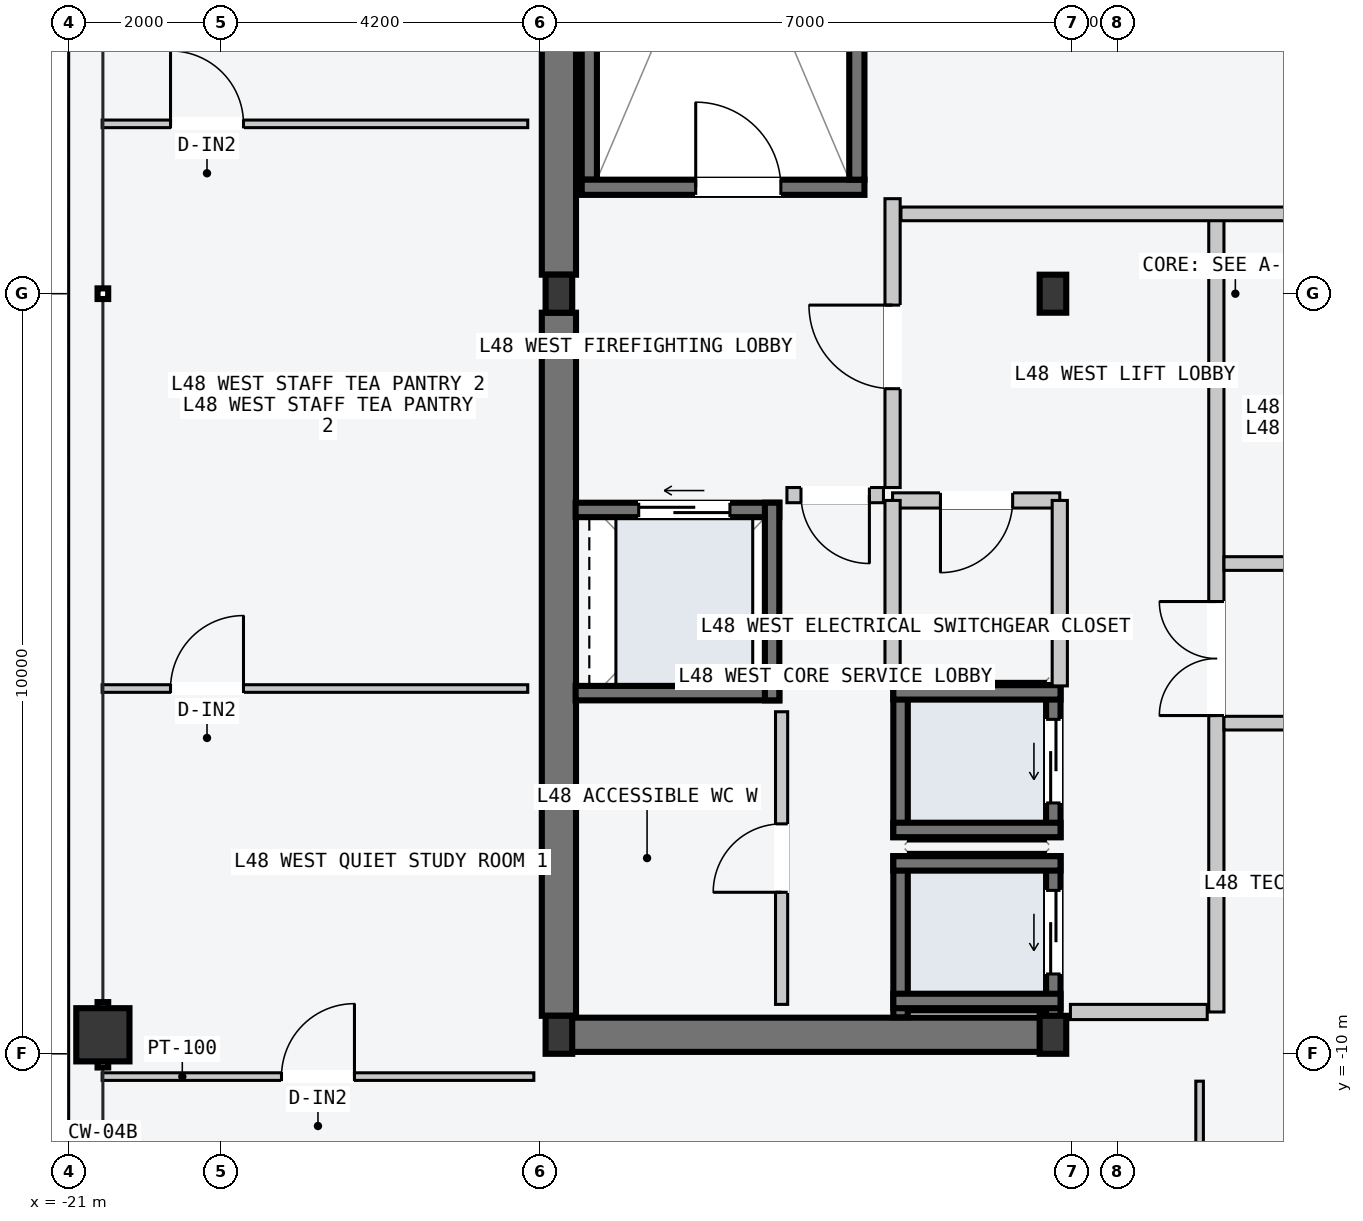
"""IFC4 building model, lengths in metres.
Left out: names, types, materials, properties, quantities, classifications, styles, units other than length and angle.
Written with IfcOpenShell. Run it as: python <this file> out.ifc"""

import sys

from ifc_helpers import new_model, si_unit, direction, frame, frame_2d, origin, origin_2d, place, context, subcontext, project, spatial, rectangle, hollow_rectangle, i_section, extrude, element, fill, save


model = new_model("IFC4")
c1 = context("Model", 3, precision=1e-05, world=origin(), true_north=direction((0.0, 1.0)))
c2 = subcontext(c1, "Body", "Model", "MODEL_VIEW")
j1 = project(units=[si_unit("LENGTHUNIT", "METRE"), si_unit("PLANEANGLEUNIT", "RADIAN")], contexts=[c1])
p1 = place(None, origin())
s1 = spatial("IfcSite", under=j1, at=p1, CompositionType="ELEMENT")
p2 = place(p1, origin())
s2 = spatial("IfcBuilding", under=s1, at=p2, CompositionType="ELEMENT")
p3 = place(p2, frame((0.0, 0.0, 183.9)))
s3 = spatial("IfcBuildingStorey", under=s2, at=p3, CompositionType="ELEMENT", Elevation=183.9)
p4 = place(p3, frame((-14.53, -9.75, -0.2), z_axis=(0.0, 0.0, 1.0), x_axis=(1.0, 0.0, 0.0)))
e1 = element("IfcWall", 1, at=p4, inside=s3, PredefinedType="SHEAR", context=c2, shape_type="SweptSolid", body=[
    extrude(rectangle(XDim=6.46, YDim=0.45, at=frame_2d((3.23, 0.0))), origin(), (0.0, 0.0, 1.0), 3.6),
])
for number, where, z_axis, x_axis in (
    (2, (-14.55, -9.5, -0.2), (0.0, 0.0, 1.0), (0.0, 1.0, 0.0)),
    (3, (-14.55, 0.25, -0.2), (0.0, 0.0, 1.0), (0.0, 1.0, 0.0)),
):
    element("IfcWall", number, at=place(p3, frame(where, z_axis=z_axis, x_axis=x_axis)), inside=s3, PredefinedType="SHEAR", context=c2, shape_type="SweptSolid", body=[
        extrude(rectangle(XDim=9.25, YDim=0.45, at=frame_2d((4.625, 0.0))), origin(), (0.0, 0.0, 1.0), 3.6),
    ])
p5 = place(p3, frame((-14.15, 1.5, -0.2), z_axis=(0.0, 0.0, 1.0), x_axis=(0.0, 1.0, 0.0)))
e4 = element("IfcWall", 4, at=p5, inside=s3, PredefinedType="SOLIDWALL", context=c2, shape_type="SweptSolid", body=[
    extrude(rectangle(XDim=7.8, YDim=0.2, at=frame_2d((3.9, 0.0))), origin(), (0.0, 0.0, 1.0), 3.6),
])
p6 = place(p3, frame((-14.25, 1.4, -0.2), z_axis=(0.0, 0.0, 1.0), x_axis=(1.0, 0.0, 0.0)))
e5 = element("IfcWall", 5, at=p6, inside=s3, PredefinedType="SOLIDWALL", context=c2, shape_type="SweptSolid", body=[
    extrude(rectangle(XDim=3.72, YDim=0.2, at=frame_2d((1.86, 0.0))), origin(), (0.0, 0.0, 1.0), 3.6),
])
p7 = place(p6, frame((1.5, 0.0, 0.2)))
e6 = element("IfcOpeningElement", 6, at=p7, cuts=e5, PredefinedType="OPENING", context=c2, shape_type="SweptSolid", body=[
    extrude(rectangle(XDim=1.12, YDim=2.18, at=frame_2d((0.56, 1.09))), frame((0.0, 0.11, 0.0), z_axis=(0.0, -1.0, 0.0), x_axis=(1.0, 0.0, 0.0)), (0.0, 0.0, 1.0), 0.22),
])
p8 = place(p3, frame((-10.63, 1.5, -0.2), z_axis=(0.0, 0.0, 1.0), x_axis=(0.0, 1.0, 0.0)))
e7 = element("IfcWall", 7, at=p8, inside=s3, PredefinedType="SOLIDWALL", context=c2, shape_type="SweptSolid", body=[
    extrude(rectangle(XDim=7.8, YDim=0.2, at=frame_2d((3.9, 0.0))), origin(), (0.0, 0.0, 1.0), 3.6),
])
for number, where, z_axis, x_axis in (
    (8, (-14.55, -9.75, 0.0), (0.0, 0.0, 1.0), (1.0, 0.0, 0.0)),
    (9, (-14.55, 0.0, 0.0), (0.0, 0.0, 1.0), (1.0, 0.0, 0.0)),
    (10, (-8.05, -9.75, 0.0), (0.0, 0.0, 1.0), (1.0, 0.0, 0.0)),
    (11, (-8.05, 0.0, 0.0), (0.0, 0.0, 1.0), (1.0, 0.0, 0.0)),
):
    element("IfcColumn", number, at=place(p3, frame(where, z_axis=z_axis, x_axis=x_axis)), inside=s3, PredefinedType="COLUMN", context=c2, shape_type="SweptSolid", body=[
        extrude(i_section(OverallWidth=0.35, OverallDepth=0.5, WebThickness=0.02, FlangeThickness=0.032, at=origin_2d()), origin(), (0.0, 0.0, 1.0), 3.6),
    ])
p9 = place(p3, frame((-20.55, -9.75, 0.0), z_axis=(0.0, 0.0, 1.0), x_axis=(0.0, 1.0, 0.0)))
e12 = element("IfcColumn", 12, at=p9, inside=s3, PredefinedType="COLUMN", context=c2, shape_type="SweptSolid", body=[
    extrude(hollow_rectangle(XDim=0.7, YDim=0.7, WallThickness=0.03, at=origin_2d()), origin(), (0.0, 0.0, 1.0), 3.6),
])
p10 = place(p3, frame((-8.045, -9.52, -0.2), z_axis=(0.0, 0.0, 1.0), x_axis=(0.0, 1.0, 0.0)))
e13 = element("IfcWall", 13, at=p10, inside=s3, PredefinedType="SOLIDWALL", context=c2, shape_type="SweptSolid", body=[
    extrude(rectangle(XDim=2.12, YDim=0.19, at=frame_2d((1.06, 0.0))), origin(), (0.0, 0.0, 1.0), 3.6),
])
p11 = place(p10, frame((0.57, 0.0, 0.2)))
e14 = element("IfcOpeningElement", 14, at=p11, cuts=e13, PredefinedType="OPENING", context=c2, shape_type="SweptSolid", body=[
    extrude(rectangle(XDim=1.1, YDim=2.2, at=frame_2d((0.55, 1.1))), frame((0.0, 0.105, 0.0), z_axis=(0.0, -1.0, 0.0), x_axis=(1.0, 0.0, 0.0)), (0.0, 0.0, 1.0), 0.21),
])
p12 = place(p3, frame((-10.055, -9.52, -0.2), z_axis=(0.0, 0.0, 1.0), x_axis=(0.0, 1.0, 0.0)))
e15 = element("IfcWall", 15, at=p12, inside=s3, PredefinedType="SOLIDWALL", context=c2, shape_type="SweptSolid", body=[
    extrude(rectangle(XDim=2.12, YDim=0.19, at=frame_2d((1.06, 0.0))), origin(), (0.0, 0.0, 1.0), 3.6),
])
for number, where, z_axis, x_axis in (
    (16, (-10.15, -7.495, -0.2), (0.0, 0.0, 1.0), (1.0, 0.0, 0.0)),
    (17, (-10.15, -9.305, -0.2), (0.0, 0.0, 1.0), (1.0, 0.0, 0.0)),
):
    element("IfcWall", number, at=place(p3, frame(where, z_axis=z_axis, x_axis=x_axis)), inside=s3, PredefinedType="SOLIDWALL", context=c2, shape_type="SweptSolid", body=[
        extrude(rectangle(XDim=2.2, YDim=0.19, at=frame_2d((1.1, 0.0))), origin(), (0.0, 0.0, 1.0), 3.6),
    ])
p13 = place(p3, frame((-8.045, -7.15, -0.2), z_axis=(0.0, 0.0, 1.0), x_axis=(0.0, 1.0, 0.0)))
e18 = element("IfcWall", 18, at=p13, inside=s3, PredefinedType="SOLIDWALL", context=c2, shape_type="SweptSolid", body=[
    extrude(rectangle(XDim=2.0, YDim=0.19, at=frame_2d((1.0, 0.0))), origin(), (0.0, 0.0, 1.0), 3.6),
])
p14 = place(p13, frame((0.45, 0.0, 0.2)))
e19 = element("IfcOpeningElement", 19, at=p14, cuts=e18, PredefinedType="OPENING", context=c2, shape_type="SweptSolid", body=[
    extrude(rectangle(XDim=1.1, YDim=2.2, at=frame_2d((0.55, 1.1))), frame((0.0, 0.105, 0.0), z_axis=(0.0, -1.0, 0.0), x_axis=(1.0, 0.0, 0.0)), (0.0, 0.0, 1.0), 0.21),
])
p15 = place(p3, frame((-10.055, -7.15, -0.2), z_axis=(0.0, 0.0, 1.0), x_axis=(0.0, 1.0, 0.0)))
e20 = element("IfcWall", 20, at=p15, inside=s3, PredefinedType="SOLIDWALL", context=c2, shape_type="SweptSolid", body=[
    extrude(rectangle(XDim=2.0, YDim=0.19, at=frame_2d((1.0, 0.0))), origin(), (0.0, 0.0, 1.0), 3.6),
])
for number, where, z_axis, x_axis in (
    (21, (-10.15, -5.245, -0.2), (0.0, 0.0, 1.0), (1.0, 0.0, 0.0)),
    (22, (-10.15, -7.055, -0.2), (0.0, 0.0, 1.0), (1.0, 0.0, 0.0)),
):
    element("IfcWall", number, at=place(p3, frame(where, z_axis=z_axis, x_axis=x_axis)), inside=s3, PredefinedType="SOLIDWALL", context=c2, shape_type="SweptSolid", body=[
        extrude(rectangle(XDim=2.2, YDim=0.19, at=frame_2d((1.1, 0.0))), origin(), (0.0, 0.0, 1.0), 3.6),
    ])
p16 = place(p3, frame((-14.33, -2.845, -0.2), z_axis=(0.0, 0.0, 1.0), x_axis=(1.0, 0.0, 0.0)))
e23 = element("IfcWall", 23, at=p16, inside=s3, PredefinedType="SOLIDWALL", context=c2, shape_type="SweptSolid", body=[
    extrude(rectangle(XDim=2.68, YDim=0.19, at=frame_2d((1.34, 0.0))), origin(), (0.0, 0.0, 1.0), 3.6),
])
p17 = place(p16, frame((0.83, 0.0, 0.2)))
e24 = element("IfcOpeningElement", 24, at=p17, cuts=e23, PredefinedType="OPENING", context=c2, shape_type="SweptSolid", body=[
    extrude(rectangle(XDim=1.2, YDim=2.2, at=frame_2d((0.6, 1.1))), frame((0.0, 0.105, 0.0), z_axis=(0.0, -1.0, 0.0), x_axis=(1.0, 0.0, 0.0)), (0.0, 0.0, 1.0), 0.21),
])
p18 = place(p3, frame((-14.33, -5.255, -0.2), z_axis=(0.0, 0.0, 1.0), x_axis=(1.0, 0.0, 0.0)))
e25 = element("IfcWall", 25, at=p18, inside=s3, PredefinedType="SOLIDWALL", context=c2, shape_type="SweptSolid", body=[
    extrude(rectangle(XDim=2.68, YDim=0.19, at=frame_2d((1.34, 0.0))), origin(), (0.0, 0.0, 1.0), 3.6),
])
p19 = place(p3, frame((-11.745, -5.35, -0.2), z_axis=(0.0, 0.0, 1.0), x_axis=(0.0, 1.0, 0.0)))
e26 = element("IfcWall", 26, at=p19, inside=s3, PredefinedType="SOLIDWALL", context=c2, shape_type="SweptSolid", body=[
    extrude(rectangle(XDim=2.6, YDim=0.19, at=frame_2d((1.3, 0.0))), origin(), (0.0, 0.0, 1.0), 3.6),
])
p20 = place(p3, frame((-5.9, -9.45, 0.0), z_axis=(0.0, 0.0, 1.0), x_axis=(0.0, 1.0, 0.0)))
e27 = element("IfcWall", 27, at=p20, inside=s3, PredefinedType="PARTITIONING", context=c2, shape_type="SweptSolid", body=[
    extrude(rectangle(XDim=10.5, YDim=0.2, at=frame_2d((5.25, 0.0))), origin(), (0.0, 0.0, 1.0), 3.4),
])
p21 = place(p20, frame((3.9, 0.0, 0.0)))
e28 = element("IfcOpeningElement", 28, at=p21, cuts=e27, PredefinedType="OPENING", context=c2, shape_type="SweptSolid", body=[
    extrude(rectangle(XDim=1.5, YDim=2.2, at=frame_2d((0.75, 1.1))), frame((0.0, 0.11, 0.0), z_axis=(0.0, -1.0, 0.0), x_axis=(1.0, 0.0, 0.0)), (0.0, 0.0, 1.0), 0.22),
])
p22 = place(p3, frame((-6.02, -9.45, 0.0), z_axis=(0.0, 0.0, 1.0), x_axis=(-1.0, 0.0, 0.0)))
e29 = element("IfcWall", 29, at=p22, inside=s3, PredefinedType="PARTITIONING", context=c2, shape_type="SweptSolid", body=[
    extrude(rectangle(XDim=1.8, YDim=0.2, at=frame_2d((0.9, 0.0))), origin(), (0.0, 0.0, 1.0), 3.4),
])
p23 = place(p3, frame((-10.16, -2.55, 0.0), z_axis=(0.0, 0.0, 1.0), x_axis=(0.0, 1.0, 0.0)))
e30 = element("IfcWall", 30, at=p23, inside=s3, PredefinedType="PARTITIONING", context=c2, shape_type="SweptSolid", body=[
    extrude(rectangle(XDim=3.8, YDim=0.2, at=frame_2d((1.9, 0.0))), origin(), (0.0, 0.0, 1.0), 3.4),
])
p24 = place(p23, frame((1.3, 0.0, 0.0)))
e31 = element("IfcOpeningElement", 31, at=p24, cuts=e30, PredefinedType="OPENING", context=c2, shape_type="SweptSolid", body=[
    extrude(rectangle(XDim=1.1, YDim=2.15, at=frame_2d((0.55, 1.075))), frame((0.0, 0.11, 0.0), z_axis=(0.0, -1.0, 0.0), x_axis=(1.0, 0.0, 0.0)), (0.0, 0.0, 1.0), 0.22),
])
p25 = place(p3, frame((-10.28, -2.65, 0.0), z_axis=(0.0, 0.0, 1.0), x_axis=(-1.0, 0.0, 0.0)))
e32 = element("IfcWall", 32, at=p25, inside=s3, PredefinedType="PARTITIONING", context=c2, shape_type="SweptSolid", body=[
    extrude(rectangle(XDim=1.27, YDim=0.2, at=frame_2d((0.635, 0.0))), origin(), (0.0, 0.0, 1.0), 3.4),
])
p26 = place(p25, frame((0.185, 0.0, 0.0)))
e33 = element("IfcOpeningElement", 33, at=p26, cuts=e32, PredefinedType="OPENING", context=c2, shape_type="SweptSolid", body=[
    extrude(rectangle(XDim=0.9, YDim=2.15, at=frame_2d((0.45, 1.075))), frame((0.0, 0.11, 0.0), z_axis=(0.0, -1.0, 0.0), x_axis=(1.0, 0.0, 0.0)), (0.0, 0.0, 1.0), 0.22),
])
p27 = place(p3, frame((-7.96, -2.72, 0.0), z_axis=(0.0, 0.0, 1.0), x_axis=(-1.0, 0.0, 0.0)))
e34 = element("IfcWall", 34, at=p27, inside=s3, PredefinedType="PARTITIONING", context=c2, shape_type="SweptSolid", body=[
    extrude(rectangle(XDim=2.2, YDim=0.2, at=frame_2d((1.1, 0.0))), origin(), (0.0, 0.0, 1.0), 3.4),
])
p28 = place(p27, frame((0.62, 0.0, 0.0)))
e35 = element("IfcOpeningElement", 35, at=p28, cuts=e34, PredefinedType="OPENING", context=c2, shape_type="SweptSolid", body=[
    extrude(rectangle(XDim=0.95, YDim=2.1, at=frame_2d((0.475, 1.05))), frame((0.0, 0.11, 0.0), z_axis=(0.0, -1.0, 0.0), x_axis=(1.0, 0.0, 0.0)), (0.0, 0.0, 1.0), 0.22),
])
for number, where, z_axis, x_axis in (
    (36, (-7.96, -5.16, 0.0), (0.0, 0.0, 1.0), (0.0, 1.0, 0.0)),
    (37, (-10.16, -5.16, 0.0), (0.0, 0.0, 1.0), (0.0, 1.0, 0.0)),
):
    element("IfcWall", number, at=place(p3, frame(where, z_axis=z_axis, x_axis=x_axis)), inside=s3, PredefinedType="PARTITIONING", context=c2, shape_type="SweptSolid", body=[
        extrude(rectangle(XDim=2.44, YDim=0.2, at=frame_2d((1.22, 0.0))), origin(), (0.0, 0.0, 1.0), 3.4),
    ])
p29 = place(p3, frame((-11.62, -9.35, 0.0), z_axis=(0.0, 0.0, 1.0), x_axis=(0.0, 1.0, 0.0)))
e38 = element("IfcWall", 38, at=p29, inside=s3, PredefinedType="PARTITIONING", context=c2, shape_type="SweptSolid", body=[
    extrude(rectangle(XDim=3.85, YDim=0.16, at=frame_2d((1.925, 0.0))), origin(), (0.0, 0.0, 1.0), 3.4),
])
p30 = place(p29, frame((1.475, 0.0, 0.0)))
e39 = element("IfcOpeningElement", 39, at=p30, cuts=e38, PredefinedType="OPENING", context=c2, shape_type="SweptSolid", body=[
    extrude(rectangle(XDim=0.9, YDim=2.15, at=frame_2d((0.45, 1.075))), frame((0.0, 0.09, 0.0), z_axis=(0.0, -1.0, 0.0), x_axis=(1.0, 0.0, 0.0)), (0.0, 0.0, 1.0), 0.18),
])
p31 = place(p3, frame((-10.05, 1.05, 0.0), z_axis=(0.0, 0.0, 1.0), x_axis=(1.0, 0.0, 0.0)))
e40 = element("IfcWall", 40, at=p31, inside=s3, PredefinedType="PARTITIONING", context=c2, shape_type="SweptSolid", body=[
    extrude(rectangle(XDim=8.79, YDim=0.18, at=frame_2d((4.395, 0.0))), origin(), (0.0, 0.0, 1.0), 3.4),
])
for number, where, z_axis, x_axis in (
    (41, (-5.8, -3.55, 0.0), (0.0, 0.0, 1.0), (1.0, 0.0, 0.0)),
    (42, (-5.8, -5.65, 0.0), (0.0, 0.0, 1.0), (1.0, 0.0, 0.0)),
):
    element("IfcWall", number, at=place(p3, frame(where, z_axis=z_axis, x_axis=x_axis)), inside=s3, PredefinedType="PARTITIONING", context=c2, shape_type="SweptSolid", body=[
        extrude(rectangle(XDim=4.54, YDim=0.18, at=frame_2d((2.27, 0.0))), origin(), (0.0, 0.0, 1.0), 3.4),
    ])
p32 = place(p3, frame((-6.12, -18.56, 0.0), z_axis=(0.0, 0.0, 1.0), x_axis=(0.0, 1.0, 0.0)))
e43 = element("IfcWall", 43, at=p32, inside=s3, PredefinedType="PARTITIONING", context=c2, shape_type="SweptSolid", body=[
    extrude(rectangle(XDim=8.2, YDim=0.1, at=frame_2d((4.1, 0.0))), origin(), (0.0, 0.0, 1.0), 3.4),
])
p33 = place(p32, frame((1.05, 0.0, 0.0)))
e44 = element("IfcOpeningElement", 44, at=p33, cuts=e43, PredefinedType="OPENING", context=c2, shape_type="SweptSolid", body=[
    extrude(rectangle(XDim=0.96, YDim=2.18, at=frame_2d((0.48, 1.09))), frame((0.0, 0.06, 0.0), z_axis=(0.0, -1.0, 0.0), x_axis=(1.0, 0.0, 0.0)), (0.0, 0.0, 1.0), 0.12),
])
p34 = place(p3, frame((-20.56, -10.3, 0.0), z_axis=(0.0, 0.0, 1.0), x_axis=(1.0, 0.0, 0.0)))
e45 = element("IfcWall", 45, at=p34, inside=s3, PredefinedType="PARTITIONING", context=c2, shape_type="SweptSolid", body=[
    extrude(rectangle(XDim=5.68, YDim=0.1, at=frame_2d((2.84, 0.0))), origin(), (0.0, 0.0, 1.0), 3.4),
])
p35 = place(p34, frame((2.36, 0.0, 0.0)))
e46 = element("IfcOpeningElement", 46, at=p35, cuts=e45, PredefinedType="OPENING", context=c2, shape_type="SweptSolid", body=[
    extrude(rectangle(XDim=0.96, YDim=2.18, at=frame_2d((0.48, 1.09))), frame((0.0, 0.06, 0.0), z_axis=(0.0, -1.0, 0.0), x_axis=(1.0, 0.0, 0.0)), (0.0, 0.0, 1.0), 0.12),
])
p36 = place(p3, frame((-20.56, -5.195, 0.0), z_axis=(0.0, 0.0, 1.0), x_axis=(1.0, 0.0, 0.0)))
e47 = element("IfcWall", 47, at=p36, inside=s3, PredefinedType="PARTITIONING", context=c2, shape_type="SweptSolid", body=[
    extrude(rectangle(XDim=5.6, YDim=0.1, at=frame_2d((2.8, 0.0))), origin(), (0.0, 0.0, 1.0), 3.4),
])
p37 = place(p36, frame((0.9, 0.0, 0.0)))
e48 = element("IfcOpeningElement", 48, at=p37, cuts=e47, PredefinedType="OPENING", context=c2, shape_type="SweptSolid", body=[
    extrude(rectangle(XDim=0.96, YDim=2.18, at=frame_2d((0.48, 1.09))), frame((0.0, 0.06, 0.0), z_axis=(0.0, -1.0, 0.0), x_axis=(1.0, 0.0, 0.0)), (0.0, 0.0, 1.0), 0.12),
])
p38 = place(p3, frame((-20.56, 2.235, 0.0), z_axis=(0.0, 0.0, 1.0), x_axis=(1.0, 0.0, 0.0)))
e49 = element("IfcWall", 49, at=p38, inside=s3, PredefinedType="PARTITIONING", context=c2, shape_type="SweptSolid", body=[
    extrude(rectangle(XDim=5.6, YDim=0.1, at=frame_2d((2.8, 0.0))), origin(), (0.0, 0.0, 1.0), 3.4),
])
p39 = place(p38, frame((0.9, 0.0, 0.0)))
e50 = element("IfcOpeningElement", 50, at=p39, cuts=e49, PredefinedType="OPENING", context=c2, shape_type="SweptSolid", body=[
    extrude(rectangle(XDim=0.96, YDim=2.18, at=frame_2d((0.48, 1.09))), frame((0.0, 0.06, 0.0), z_axis=(0.0, -1.0, 0.0), x_axis=(1.0, 0.0, 0.0)), (0.0, 0.0, 1.0), 0.12),
])
p40 = place(p7, origin())
e51 = element("IfcDoor", 51, at=p40, inside=s3, OperationType="SINGLE_SWING_LEFT", PredefinedType="DOOR", context=c2, shape_type="SweptSolid", body=[
    extrude(rectangle(XDim=1.12, YDim=2.18, at=frame_2d((0.56, 1.09))), frame((0.0, 0.025, 0.0), z_axis=(0.0, -1.0, 0.0), x_axis=(1.0, 0.0, 0.0)), (0.0, 0.0, 1.0), 0.05),
])
fill(e6, e51)
p41 = place(p11, origin())
e52 = element("IfcDoor", 52, at=p41, inside=s3, OperationType="SLIDING_TO_LEFT", PredefinedType="DOOR", context=c2, shape_type="SweptSolid", body=[
    extrude(rectangle(XDim=1.1, YDim=2.2, at=frame_2d((0.55, 1.1))), frame((0.0, 0.025, 0.0), z_axis=(0.0, -1.0, 0.0), x_axis=(1.0, 0.0, 0.0)), (0.0, 0.0, 1.0), 0.05),
])
fill(e14, e52)
p42 = place(p14, origin())
e53 = element("IfcDoor", 53, at=p42, inside=s3, OperationType="SLIDING_TO_LEFT", PredefinedType="DOOR", context=c2, shape_type="SweptSolid", body=[
    extrude(rectangle(XDim=1.1, YDim=2.2, at=frame_2d((0.55, 1.1))), frame((0.0, 0.025, 0.0), z_axis=(0.0, -1.0, 0.0), x_axis=(1.0, 0.0, 0.0)), (0.0, 0.0, 1.0), 0.05),
])
fill(e19, e53)
p43 = place(p17, origin())
e54 = element("IfcDoor", 54, at=p43, inside=s3, OperationType="SLIDING_TO_LEFT", PredefinedType="DOOR", context=c2, shape_type="SweptSolid", body=[
    extrude(rectangle(XDim=1.2, YDim=2.2, at=frame_2d((0.6, 1.1))), frame((0.0, 0.025, 0.0), z_axis=(0.0, -1.0, 0.0), x_axis=(1.0, 0.0, 0.0)), (0.0, 0.0, 1.0), 0.05),
])
fill(e24, e54)
p44 = place(p21, origin())
e55 = element("IfcDoor", 55, at=p44, inside=s3, OperationType="DOUBLE_DOOR_SINGLE_SWING", PredefinedType="DOOR", context=c2, shape_type="SweptSolid", body=[
    extrude(rectangle(XDim=1.5, YDim=2.2, at=frame_2d((0.75, 1.1))), frame((0.0, 0.025, 0.0), z_axis=(0.0, -1.0, 0.0), x_axis=(1.0, 0.0, 0.0)), (0.0, 0.0, 1.0), 0.05),
])
fill(e28, e55)
p45 = place(p24, origin())
e56 = element("IfcDoor", 56, at=p45, inside=s3, OperationType="SINGLE_SWING_RIGHT", PredefinedType="DOOR", context=c2, shape_type="SweptSolid", body=[
    extrude(rectangle(XDim=1.1, YDim=2.15, at=frame_2d((0.55, 1.075))), frame((0.0, 0.025, 0.0), z_axis=(0.0, -1.0, 0.0), x_axis=(1.0, 0.0, 0.0)), (0.0, 0.0, 1.0), 0.05),
])
fill(e31, e56)
p46 = place(p26, origin())
e57 = element("IfcDoor", 57, at=p46, inside=s3, OperationType="SINGLE_SWING_LEFT", PredefinedType="DOOR", context=c2, shape_type="SweptSolid", body=[
    extrude(rectangle(XDim=0.9, YDim=2.15, at=frame_2d((0.45, 1.075))), frame((0.0, 0.025, 0.0), z_axis=(0.0, -1.0, 0.0), x_axis=(1.0, 0.0, 0.0)), (0.0, 0.0, 1.0), 0.05),
])
fill(e33, e57)
p47 = place(p28, origin())
e58 = element("IfcDoor", 58, at=p47, inside=s3, OperationType="SINGLE_SWING_RIGHT", PredefinedType="DOOR", context=c2, shape_type="SweptSolid", body=[
    extrude(rectangle(XDim=0.95, YDim=2.1, at=frame_2d((0.475, 1.05))), frame((0.0, 0.025, 0.0), z_axis=(0.0, -1.0, 0.0), x_axis=(1.0, 0.0, 0.0)), (0.0, 0.0, 1.0), 0.05),
])
fill(e35, e58)
p48 = place(p30, origin())
e59 = element("IfcDoor", 59, at=p48, inside=s3, OperationType="SINGLE_SWING_LEFT", PredefinedType="DOOR", context=c2, shape_type="SweptSolid", body=[
    extrude(rectangle(XDim=0.9, YDim=2.15, at=frame_2d((0.45, 1.075))), frame((0.0, 0.025, 0.0), z_axis=(0.0, -1.0, 0.0), x_axis=(1.0, 0.0, 0.0)), (0.0, 0.0, 1.0), 0.05),
])
fill(e39, e59)
p49 = place(p35, origin())
e60 = element("IfcDoor", 60, at=p49, inside=s3, OperationType="SINGLE_SWING_RIGHT", PredefinedType="DOOR", context=c2, shape_type="SweptSolid", body=[
    extrude(rectangle(XDim=0.96, YDim=2.18, at=frame_2d((0.48, 1.09))), frame((0.0, 0.025, 0.0), z_axis=(0.0, -1.0, 0.0), x_axis=(1.0, 0.0, 0.0)), (0.0, 0.0, 1.0), 0.05),
])
fill(e46, e60)
p50 = place(p37, origin())
e61 = element("IfcDoor", 61, at=p50, inside=s3, OperationType="SINGLE_SWING_RIGHT", PredefinedType="DOOR", context=c2, shape_type="SweptSolid", body=[
    extrude(rectangle(XDim=0.96, YDim=2.18, at=frame_2d((0.48, 1.09))), frame((0.0, 0.025, 0.0), z_axis=(0.0, -1.0, 0.0), x_axis=(1.0, 0.0, 0.0)), (0.0, 0.0, 1.0), 0.05),
])
fill(e48, e61)
p51 = place(p39, origin())
e62 = element("IfcDoor", 62, at=p51, inside=s3, OperationType="SINGLE_SWING_LEFT", PredefinedType="DOOR", context=c2, shape_type="SweptSolid", body=[
    extrude(rectangle(XDim=0.96, YDim=2.18, at=frame_2d((0.48, 1.09))), frame((0.0, 0.025, 0.0), z_axis=(0.0, -1.0, 0.0), x_axis=(1.0, 0.0, 0.0)), (0.0, 0.0, 1.0), 0.05),
])
fill(e50, e62)
save(model, sys.argv[1])
